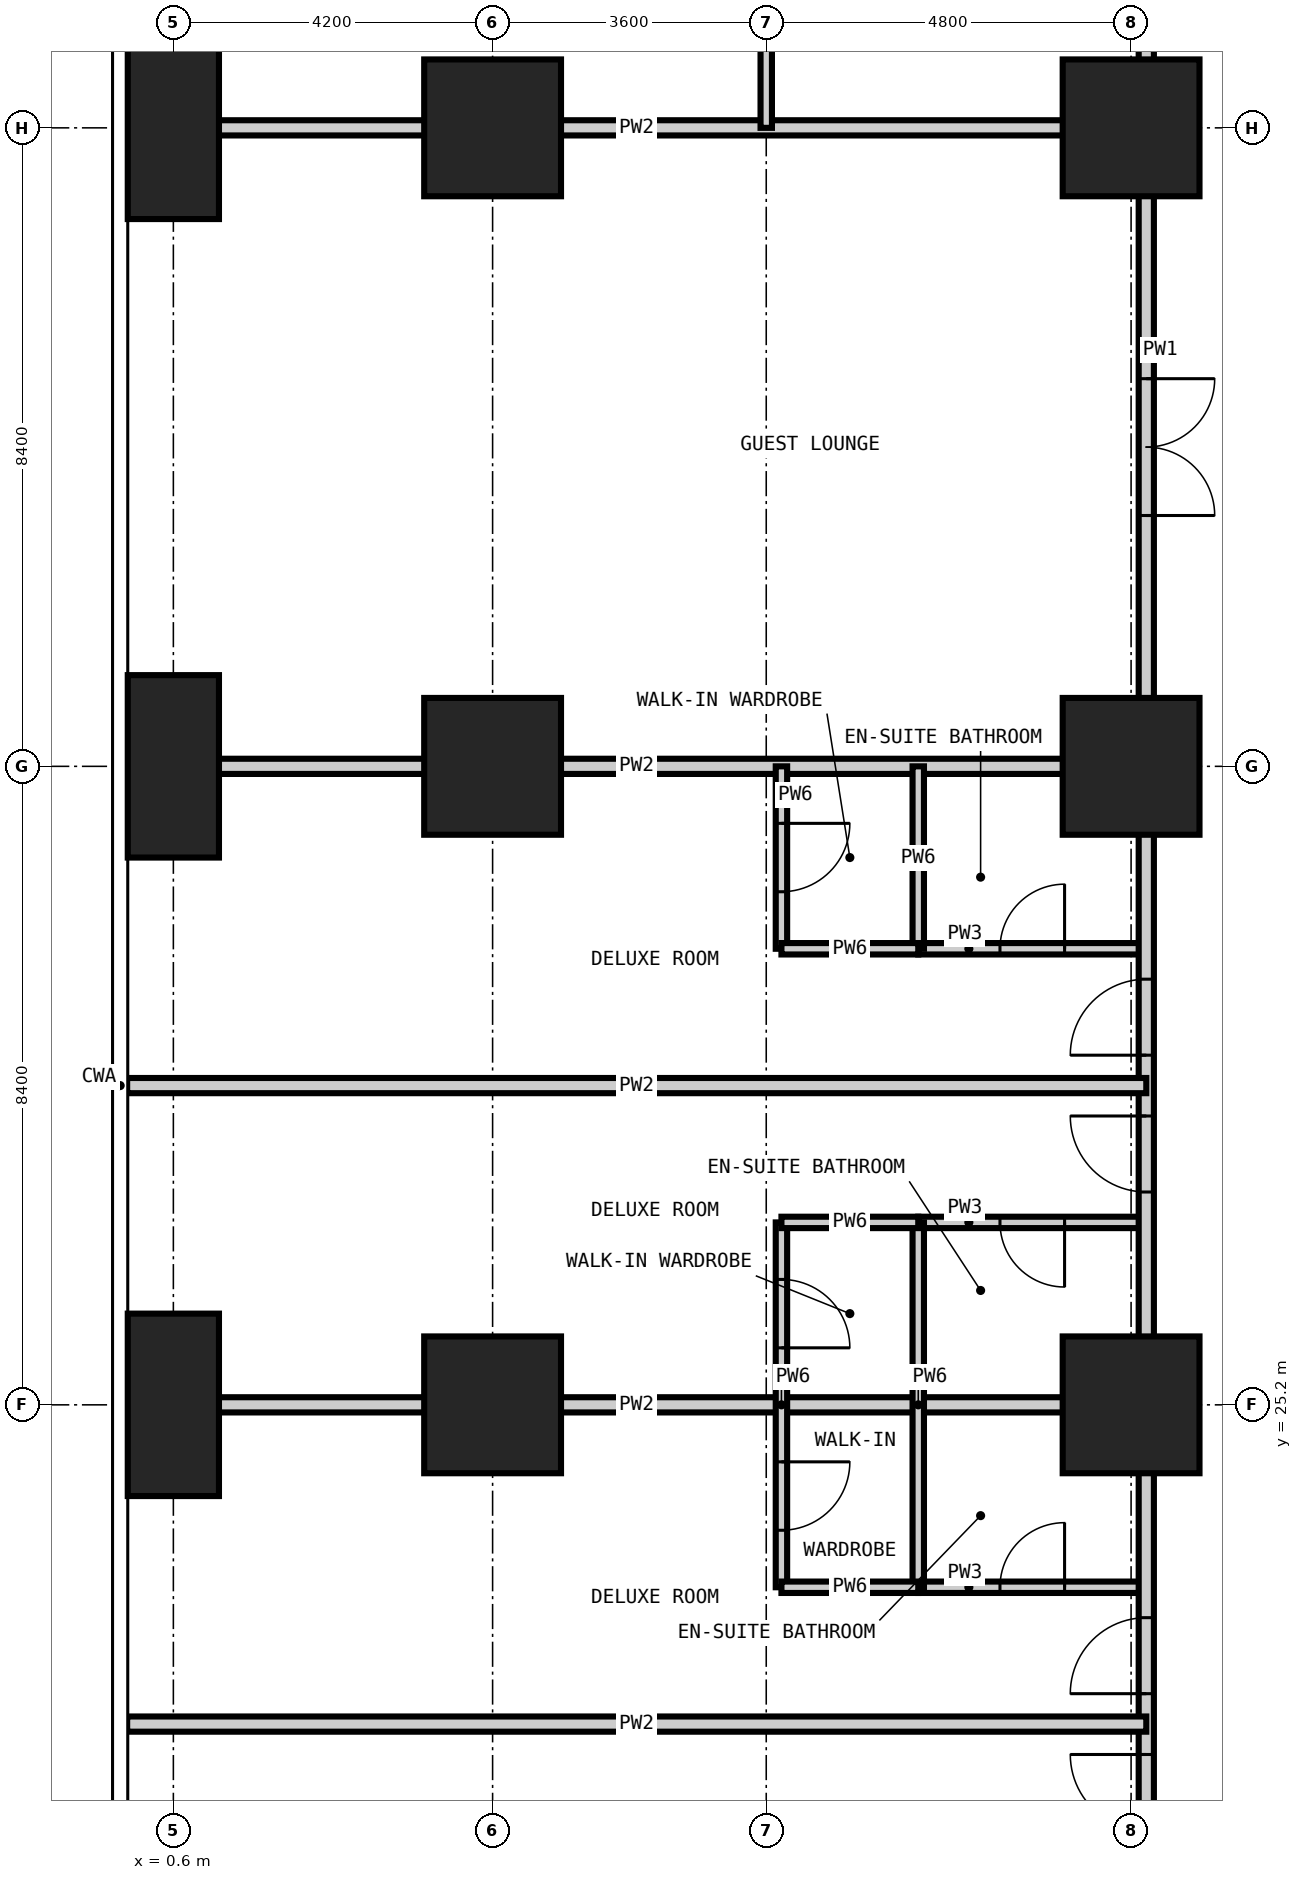
"""IFC4 building model, lengths in metres.
Left out: names, types, materials, properties, quantities, classifications, styles, units other than length and angle.
Written with IfcOpenShell. Run it as: python <this file> out.ifc"""

import sys

from ifc_helpers import new_model, si_unit, direction, frame, frame_2d, origin, origin_2d, place, context, subcontext, project, spatial, rectangle, extrude, element, fill, save


model = new_model("IFC4")
c1 = context("Model", 3, precision=1e-05, world=origin(), true_north=direction((0.0, 1.0)))
c2 = subcontext(c1, "Body", "Model", "MODEL_VIEW")
j1 = project(units=[si_unit("LENGTHUNIT", "METRE"), si_unit("PLANEANGLEUNIT", "RADIAN")], contexts=[c1])
p1 = place(None, origin())
s1 = spatial("IfcSite", under=j1, at=p1, CompositionType="ELEMENT")
p2 = place(p1, origin())
s2 = spatial("IfcBuilding", under=s1, at=p2, CompositionType="ELEMENT")
p3 = place(p2, frame((0.0, 0.0, 27.0)))
s3 = spatial("IfcBuildingStorey", under=s2, at=p3, CompositionType="ELEMENT", Elevation=27.0)
for number, where, z_axis, x_axis in (
    (1, (0.6, 25.2, -0.35), (0.0, 0.0, 1.0), (1.0, 0.0, 0.0)),
    (2, (0.6, 33.6, -0.35), (0.0, 0.0, 1.0), (1.0, 0.0, 0.0)),
    (3, (0.6, 42.0, -0.35), (0.0, 0.0, 1.0), (1.0, 0.0, 0.0)),
):
    element("IfcColumn", number, at=place(p3, frame(where, z_axis=z_axis, x_axis=x_axis)), inside=s3, PredefinedType="COLUMN", context=c2, shape_type="SweptSolid", body=[
        extrude(rectangle(XDim=1.2, YDim=2.4, at=origin_2d()), origin(), (0.0, 0.0, 1.0), 3.6),
    ])
for number, where, z_axis, x_axis in (
    (4, (4.8, 25.2, -0.35), (0.0, 0.0, 1.0), (1.0, 0.0, 0.0)),
    (5, (4.8, 33.6, -0.35), (0.0, 0.0, 1.0), (1.0, 0.0, 0.0)),
    (6, (4.8, 42.0, -0.35), (0.0, 0.0, 1.0), (1.0, 0.0, 0.0)),
    (7, (13.2, 25.2, -0.35), (0.0, 0.0, 1.0), (1.0, 0.0, 0.0)),
    (8, (13.2, 33.6, -0.35), (0.0, 0.0, 1.0), (1.0, 0.0, 0.0)),
    (9, (13.2, 42.0, -0.35), (0.0, 0.0, 1.0), (1.0, 0.0, 0.0)),
):
    element("IfcColumn", number, at=place(p3, frame(where, z_axis=z_axis, x_axis=x_axis)), inside=s3, PredefinedType="COLUMN", context=c2, shape_type="SweptSolid", body=[
        extrude(rectangle(XDim=1.8, YDim=1.8, at=origin_2d()), origin(), (0.0, 0.0, 1.0), 3.6),
    ])
p4 = place(p3, frame((10.4, 22.8, 0.0), z_axis=(0.0, 0.0, 1.0), x_axis=(1.0, 0.0, 0.0)))
e10 = element("IfcWall", 10, at=p4, inside=s3, PredefinedType="PARTITIONING", context=c2, shape_type="SweptSolid", body=[
    extrude(rectangle(XDim=3.0, YDim=0.15, at=frame_2d((1.5, 0.0))), origin(), (0.0, 0.0, 1.0), 3.25),
])
p5 = place(p4, frame((1.075, 0.0, 0.0)))
e11 = element("IfcOpeningElement", 11, at=p5, cuts=e10, PredefinedType="OPENING", context=c2, shape_type="SweptSolid", body=[
    extrude(rectangle(XDim=0.85, YDim=2.1, at=frame_2d((0.425, 1.05))), frame((0.0, 0.085, 0.0), z_axis=(0.0, -1.0, 0.0), x_axis=(1.0, 0.0, 0.0)), (0.0, 0.0, 1.0), 0.17),
])
p6 = place(p3, frame((10.4, 27.6, 0.0), z_axis=(0.0, 0.0, 1.0), x_axis=(1.0, 0.0, 0.0)))
e12 = element("IfcWall", 12, at=p6, inside=s3, PredefinedType="PARTITIONING", context=c2, shape_type="SweptSolid", body=[
    extrude(rectangle(XDim=3.0, YDim=0.15, at=frame_2d((1.5, 0.0))), origin(), (0.0, 0.0, 1.0), 3.25),
])
p7 = place(p6, frame((1.075, 0.0, 0.0)))
e13 = element("IfcOpeningElement", 13, at=p7, cuts=e12, PredefinedType="OPENING", context=c2, shape_type="SweptSolid", body=[
    extrude(rectangle(XDim=0.85, YDim=2.1, at=frame_2d((0.425, 1.05))), frame((0.0, 0.085, 0.0), z_axis=(0.0, -1.0, 0.0), x_axis=(1.0, 0.0, 0.0)), (0.0, 0.0, 1.0), 0.17),
])
p8 = place(p3, frame((10.4, 31.2, 0.0), z_axis=(0.0, 0.0, 1.0), x_axis=(1.0, 0.0, 0.0)))
e14 = element("IfcWall", 14, at=p8, inside=s3, PredefinedType="PARTITIONING", context=c2, shape_type="SweptSolid", body=[
    extrude(rectangle(XDim=3.0, YDim=0.15, at=frame_2d((1.5, 0.0))), origin(), (0.0, 0.0, 1.0), 3.25),
])
p9 = place(p8, frame((1.075, 0.0, 0.0)))
e15 = element("IfcOpeningElement", 15, at=p9, cuts=e14, PredefinedType="OPENING", context=c2, shape_type="SweptSolid", body=[
    extrude(rectangle(XDim=0.85, YDim=2.1, at=frame_2d((0.425, 1.05))), frame((0.0, 0.085, 0.0), z_axis=(0.0, -1.0, 0.0), x_axis=(1.0, 0.0, 0.0)), (0.0, 0.0, 1.0), 0.17),
])
p10 = place(p3, frame((13.4, 13.4, 0.0), z_axis=(0.0, 0.0, 1.0), x_axis=(0.0, 1.0, 0.0)))
e16 = element("IfcWall", 16, at=p10, inside=s3, PredefinedType="PARTITIONING", context=c2, shape_type="SweptSolid", body=[
    extrude(rectangle(XDim=20.2, YDim=0.2, at=frame_2d((10.1, 0.0))), origin(), (0.0, 0.0, 1.0), 3.25),
])
p11 = place(p10, frame((6.2, 0.0, 0.0)))
e17 = element("IfcOpeningElement", 17, at=p11, cuts=e16, PredefinedType="OPENING", context=c2, shape_type="SweptSolid", body=[
    extrude(rectangle(XDim=1.0, YDim=2.2, at=frame_2d((0.5, 1.1))), frame((0.0, 0.11, 0.0), z_axis=(0.0, -1.0, 0.0), x_axis=(1.0, 0.0, 0.0)), (0.0, 0.0, 1.0), 0.22),
])
p12 = place(p10, frame((8.0, 0.0, 0.0)))
e18 = element("IfcOpeningElement", 18, at=p12, cuts=e16, PredefinedType="OPENING", context=c2, shape_type="SweptSolid", body=[
    extrude(rectangle(XDim=1.0, YDim=2.2, at=frame_2d((0.5, 1.1))), frame((0.0, 0.11, 0.0), z_axis=(0.0, -1.0, 0.0), x_axis=(1.0, 0.0, 0.0)), (0.0, 0.0, 1.0), 0.22),
])
p13 = place(p10, frame((14.6, 0.0, 0.0)))
e19 = element("IfcOpeningElement", 19, at=p13, cuts=e16, PredefinedType="OPENING", context=c2, shape_type="SweptSolid", body=[
    extrude(rectangle(XDim=1.0, YDim=2.2, at=frame_2d((0.5, 1.1))), frame((0.0, 0.11, 0.0), z_axis=(0.0, -1.0, 0.0), x_axis=(1.0, 0.0, 0.0)), (0.0, 0.0, 1.0), 0.22),
])
p14 = place(p10, frame((16.4, 0.0, 0.0)))
e20 = element("IfcOpeningElement", 20, at=p14, cuts=e16, PredefinedType="OPENING", context=c2, shape_type="SweptSolid", body=[
    extrude(rectangle(XDim=1.0, YDim=2.2, at=frame_2d((0.5, 1.1))), frame((0.0, 0.11, 0.0), z_axis=(0.0, -1.0, 0.0), x_axis=(1.0, 0.0, 0.0)), (0.0, 0.0, 1.0), 0.22),
])
p15 = place(p10, frame((1.2, 0.0, 0.0)))
e21 = element("IfcOpeningElement", 21, at=p15, cuts=e16, PredefinedType="OPENING", context=c2, shape_type="SweptSolid", body=[
    extrude(rectangle(XDim=1.0, YDim=2.2, at=frame_2d((0.5, 1.1))), frame((0.0, 0.11, 0.0), z_axis=(0.0, -1.0, 0.0), x_axis=(1.0, 0.0, 0.0)), (0.0, 0.0, 1.0), 0.22),
])
p16 = place(p3, frame((13.4, 42.0, 0.0), z_axis=(0.0, 0.0, 1.0), x_axis=(0.0, 1.0, 0.0)))
e22 = element("IfcWall", 22, at=p16, inside=s3, PredefinedType="PARTITIONING", context=c2, shape_type="SweptSolid", body=[
    extrude(rectangle(XDim=4.0, YDim=0.2, at=frame_2d((2.0, 0.0))), origin(), (0.0, 0.0, 1.0), 3.25),
])
p17 = place(p16, frame((1.5, 0.0, 0.0)))
e23 = element("IfcOpeningElement", 23, at=p17, cuts=e22, PredefinedType="OPENING", context=c2, shape_type="SweptSolid", body=[
    extrude(rectangle(XDim=1.0, YDim=2.2, at=frame_2d((0.5, 1.1))), frame((0.0, 0.11, 0.0), z_axis=(0.0, -1.0, 0.0), x_axis=(1.0, 0.0, 0.0)), (0.0, 0.0, 1.0), 0.22),
])
p18 = place(p3, frame((13.4, 42.0, 0.0), z_axis=(0.0, 0.0, 1.0), x_axis=(0.0, -1.0, 0.0)))
e24 = element("IfcWall", 24, at=p18, inside=s3, PredefinedType="PARTITIONING", context=c2, shape_type="SweptSolid", body=[
    extrude(rectangle(XDim=8.4, YDim=0.2, at=frame_2d((4.2, 0.0))), origin(), (0.0, 0.0, 1.0), 3.25),
])
p19 = place(p18, frame((3.3, 0.0, 0.0)))
e25 = element("IfcOpeningElement", 25, at=p19, cuts=e24, PredefinedType="OPENING", context=c2, shape_type="SweptSolid", body=[
    extrude(rectangle(XDim=1.8, YDim=2.4, at=frame_2d((0.9, 1.2))), frame((0.0, 0.11, 0.0), z_axis=(0.0, -1.0, 0.0), x_axis=(1.0, 0.0, 0.0)), (0.0, 0.0, 1.0), 0.22),
])
for number, where, z_axis, x_axis in (
    (26, (-0.008, 21.0, 0.0), (0.0, 0.0, 1.0), (1.0, 0.0, 0.0)),
    (27, (-0.008, 25.2, 0.0), (0.0, 0.0, 1.0), (1.0, 0.0, 0.0)),
    (28, (-0.008, 29.4, 0.0), (0.0, 0.0, 1.0), (1.0, 0.0, 0.0)),
    (29, (-0.008, 33.6, 0.0), (0.0, 0.0, 1.0), (1.0, 0.0, 0.0)),
    (30, (-0.008, 42.0, 0.0), (0.0, 0.0, 1.0), (1.0, 0.0, 0.0)),
):
    element("IfcWall", number, at=place(p3, frame(where, z_axis=z_axis, x_axis=x_axis)), inside=s3, PredefinedType="PARTITIONING", context=c2, shape_type="SweptSolid", body=[
        extrude(rectangle(XDim=13.408, YDim=0.2, at=frame_2d((6.704, 0.0))), origin(), (0.0, 0.0, 1.0), 3.25),
    ])
p20 = place(p3, frame((8.4, 42.0, 0.0), z_axis=(0.0, 0.0, 1.0), x_axis=(0.0, 1.0, 0.0)))
e31 = element("IfcWall", 31, at=p20, inside=s3, PredefinedType="PARTITIONING", context=c2, shape_type="SweptSolid", body=[
    extrude(rectangle(XDim=16.808, YDim=0.15, at=frame_2d((8.404, 0.0))), origin(), (0.0, 0.0, 1.0), 3.25),
])
p21 = place(p20, frame((13.95, 0.0, 0.0)))
e32 = element("IfcOpeningElement", 32, at=p21, cuts=e31, PredefinedType="OPENING", context=c2, shape_type="SweptSolid", body=[
    extrude(rectangle(XDim=0.9, YDim=2.1, at=frame_2d((0.45, 1.05))), frame((0.0, 0.085, 0.0), z_axis=(0.0, -1.0, 0.0), x_axis=(1.0, 0.0, 0.0)), (0.0, 0.0, 1.0), 0.17),
])
p22 = place(p20, frame((3.75, 0.0, 0.0)))
e33 = element("IfcOpeningElement", 33, at=p22, cuts=e31, PredefinedType="OPENING", context=c2, shape_type="SweptSolid", body=[
    extrude(rectangle(XDim=0.9, YDim=2.1, at=frame_2d((0.45, 1.05))), frame((0.0, 0.085, 0.0), z_axis=(0.0, -1.0, 0.0), x_axis=(1.0, 0.0, 0.0)), (0.0, 0.0, 1.0), 0.17),
])
p23 = place(p3, frame((8.6, 22.8, 0.0), z_axis=(0.0, 0.0, 1.0), x_axis=(0.0, 1.0, 0.0)))
e34 = element("IfcWall", 34, at=p23, inside=s3, PredefinedType="PARTITIONING", context=c2, shape_type="SweptSolid", body=[
    extrude(rectangle(XDim=4.8, YDim=0.15, at=frame_2d((2.4, 0.0))), origin(), (0.0, 0.0, 1.0), 3.25),
])
p24 = place(p23, frame((0.75, 0.0, 0.0)))
e35 = element("IfcOpeningElement", 35, at=p24, cuts=e34, PredefinedType="OPENING", context=c2, shape_type="SweptSolid", body=[
    extrude(rectangle(XDim=0.9, YDim=2.1, at=frame_2d((0.45, 1.05))), frame((0.0, 0.085, 0.0), z_axis=(0.0, -1.0, 0.0), x_axis=(1.0, 0.0, 0.0)), (0.0, 0.0, 1.0), 0.17),
])
p25 = place(p23, frame((3.15, 0.0, 0.0)))
e36 = element("IfcOpeningElement", 36, at=p25, cuts=e34, PredefinedType="OPENING", context=c2, shape_type="SweptSolid", body=[
    extrude(rectangle(XDim=0.9, YDim=2.1, at=frame_2d((0.45, 1.05))), frame((0.0, 0.085, 0.0), z_axis=(0.0, -1.0, 0.0), x_axis=(1.0, 0.0, 0.0)), (0.0, 0.0, 1.0), 0.17),
])
p26 = place(p3, frame((8.6, 31.2, 0.0), z_axis=(0.0, 0.0, 1.0), x_axis=(0.0, 1.0, 0.0)))
e37 = element("IfcWall", 37, at=p26, inside=s3, PredefinedType="PARTITIONING", context=c2, shape_type="SweptSolid", body=[
    extrude(rectangle(XDim=2.4, YDim=0.15, at=frame_2d((1.2, 0.0))), origin(), (0.0, 0.0, 1.0), 3.25),
])
p27 = place(p26, frame((0.75, 0.0, 0.0)))
e38 = element("IfcOpeningElement", 38, at=p27, cuts=e37, PredefinedType="OPENING", context=c2, shape_type="SweptSolid", body=[
    extrude(rectangle(XDim=0.9, YDim=2.1, at=frame_2d((0.45, 1.05))), frame((0.0, 0.085, 0.0), z_axis=(0.0, -1.0, 0.0), x_axis=(1.0, 0.0, 0.0)), (0.0, 0.0, 1.0), 0.17),
])
p28 = place(p3, frame((10.4, 22.8, 0.0), z_axis=(0.0, 0.0, 1.0), x_axis=(0.0, 1.0, 0.0)))
e39 = element("IfcWall", 39, at=p28, inside=s3, PredefinedType="PARTITIONING", context=c2, shape_type="SweptSolid", body=[
    extrude(rectangle(XDim=4.8, YDim=0.15, at=frame_2d((2.4, 0.0))), origin(), (0.0, 0.0, 1.0), 3.25),
])
p29 = place(p3, frame((10.4, 31.2, 0.0), z_axis=(0.0, 0.0, 1.0), x_axis=(0.0, 1.0, 0.0)))
e40 = element("IfcWall", 40, at=p29, inside=s3, PredefinedType="PARTITIONING", context=c2, shape_type="SweptSolid", body=[
    extrude(rectangle(XDim=2.4, YDim=0.15, at=frame_2d((1.2, 0.0))), origin(), (0.0, 0.0, 1.0), 3.25),
])
for number, where, z_axis, x_axis in (
    (41, (8.6, 22.8, 0.0), (0.0, 0.0, 1.0), (1.0, 0.0, 0.0)),
    (42, (8.6, 27.6, 0.0), (0.0, 0.0, 1.0), (1.0, 0.0, 0.0)),
    (43, (8.6, 31.2, 0.0), (0.0, 0.0, 1.0), (1.0, 0.0, 0.0)),
):
    element("IfcWall", number, at=place(p3, frame(where, z_axis=z_axis, x_axis=x_axis)), inside=s3, PredefinedType="PARTITIONING", context=c2, shape_type="SweptSolid", body=[
        extrude(rectangle(XDim=1.8, YDim=0.15, at=frame_2d((0.9, 0.0))), origin(), (0.0, 0.0, 1.0), 3.25),
    ])
p30 = place(p11, origin())
e44 = element("IfcDoor", 44, at=p30, inside=s3, OperationType="SINGLE_SWING_RIGHT", PredefinedType="DOOR", context=c2, shape_type="SweptSolid", body=[
    extrude(rectangle(XDim=1.0, YDim=2.2, at=frame_2d((0.5, 1.1))), frame((0.0, 0.025, 0.0), z_axis=(0.0, -1.0, 0.0), x_axis=(1.0, 0.0, 0.0)), (0.0, 0.0, 1.0), 0.05),
])
fill(e17, e44)
p31 = place(p12, origin())
e45 = element("IfcDoor", 45, at=p31, inside=s3, OperationType="SINGLE_SWING_LEFT", PredefinedType="DOOR", context=c2, shape_type="SweptSolid", body=[
    extrude(rectangle(XDim=1.0, YDim=2.2, at=frame_2d((0.5, 1.1))), frame((0.0, 0.025, 0.0), z_axis=(0.0, -1.0, 0.0), x_axis=(1.0, 0.0, 0.0)), (0.0, 0.0, 1.0), 0.05),
])
fill(e18, e45)
p32 = place(p5, origin())
e46 = element("IfcDoor", 46, at=p32, inside=s3, OperationType="SINGLE_SWING_RIGHT", PredefinedType="DOOR", context=c2, shape_type="SweptSolid", body=[
    extrude(rectangle(XDim=0.85, YDim=2.1, at=frame_2d((0.425, 1.05))), frame((0.0, 0.025, 0.0), z_axis=(0.0, -1.0, 0.0), x_axis=(1.0, 0.0, 0.0)), (0.0, 0.0, 1.0), 0.05),
])
fill(e11, e46)
p33 = place(p24, frame((0.9, 0.0, 0.0), z_axis=(0.0, 0.0, 1.0), x_axis=(-1.0, 0.0, 0.0)))
e47 = element("IfcDoor", 47, at=p33, inside=s3, OperationType="SINGLE_SWING_LEFT", PredefinedType="DOOR", context=c2, shape_type="SweptSolid", body=[
    extrude(rectangle(XDim=0.9, YDim=2.1, at=frame_2d((0.45, 1.05))), frame((0.0, 0.025, 0.0), z_axis=(0.0, -1.0, 0.0), x_axis=(1.0, 0.0, 0.0)), (0.0, 0.0, 1.0), 0.05),
])
fill(e35, e47)
p34 = place(p13, origin())
e48 = element("IfcDoor", 48, at=p34, inside=s3, OperationType="SINGLE_SWING_RIGHT", PredefinedType="DOOR", context=c2, shape_type="SweptSolid", body=[
    extrude(rectangle(XDim=1.0, YDim=2.2, at=frame_2d((0.5, 1.1))), frame((0.0, 0.025, 0.0), z_axis=(0.0, -1.0, 0.0), x_axis=(1.0, 0.0, 0.0)), (0.0, 0.0, 1.0), 0.05),
])
fill(e19, e48)
p35 = place(p7, frame((0.85, 0.0, 0.0), z_axis=(0.0, 0.0, 1.0), x_axis=(-1.0, 0.0, 0.0)))
e49 = element("IfcDoor", 49, at=p35, inside=s3, OperationType="SINGLE_SWING_LEFT", PredefinedType="DOOR", context=c2, shape_type="SweptSolid", body=[
    extrude(rectangle(XDim=0.85, YDim=2.1, at=frame_2d((0.425, 1.05))), frame((0.0, 0.025, 0.0), z_axis=(0.0, -1.0, 0.0), x_axis=(1.0, 0.0, 0.0)), (0.0, 0.0, 1.0), 0.05),
])
fill(e13, e49)
p36 = place(p25, frame((0.9, 0.0, 0.0), z_axis=(0.0, 0.0, 1.0), x_axis=(-1.0, 0.0, 0.0)))
e50 = element("IfcDoor", 50, at=p36, inside=s3, OperationType="SINGLE_SWING_RIGHT", PredefinedType="DOOR", context=c2, shape_type="SweptSolid", body=[
    extrude(rectangle(XDim=0.9, YDim=2.1, at=frame_2d((0.45, 1.05))), frame((0.0, 0.025, 0.0), z_axis=(0.0, -1.0, 0.0), x_axis=(1.0, 0.0, 0.0)), (0.0, 0.0, 1.0), 0.05),
])
fill(e36, e50)
p37 = place(p14, origin())
e51 = element("IfcDoor", 51, at=p37, inside=s3, OperationType="SINGLE_SWING_LEFT", PredefinedType="DOOR", context=c2, shape_type="SweptSolid", body=[
    extrude(rectangle(XDim=1.0, YDim=2.2, at=frame_2d((0.5, 1.1))), frame((0.0, 0.025, 0.0), z_axis=(0.0, -1.0, 0.0), x_axis=(1.0, 0.0, 0.0)), (0.0, 0.0, 1.0), 0.05),
])
fill(e20, e51)
p38 = place(p9, origin())
e52 = element("IfcDoor", 52, at=p38, inside=s3, OperationType="SINGLE_SWING_RIGHT", PredefinedType="DOOR", context=c2, shape_type="SweptSolid", body=[
    extrude(rectangle(XDim=0.85, YDim=2.1, at=frame_2d((0.425, 1.05))), frame((0.0, 0.025, 0.0), z_axis=(0.0, -1.0, 0.0), x_axis=(1.0, 0.0, 0.0)), (0.0, 0.0, 1.0), 0.05),
])
fill(e15, e52)
p39 = place(p27, frame((0.9, 0.0, 0.0), z_axis=(0.0, 0.0, 1.0), x_axis=(-1.0, 0.0, 0.0)))
e53 = element("IfcDoor", 53, at=p39, inside=s3, OperationType="SINGLE_SWING_LEFT", PredefinedType="DOOR", context=c2, shape_type="SweptSolid", body=[
    extrude(rectangle(XDim=0.9, YDim=2.1, at=frame_2d((0.45, 1.05))), frame((0.0, 0.025, 0.0), z_axis=(0.0, -1.0, 0.0), x_axis=(1.0, 0.0, 0.0)), (0.0, 0.0, 1.0), 0.05),
])
fill(e38, e53)
p40 = place(p19, origin())
e54 = element("IfcDoor", 54, at=p40, inside=s3, OperationType="DOUBLE_DOOR_DOUBLE_SWING", PredefinedType="DOOR", context=c2, shape_type="SweptSolid", body=[
    extrude(rectangle(XDim=1.8, YDim=2.4, at=frame_2d((0.9, 1.2))), frame((0.0, 0.025, 0.0), z_axis=(0.0, -1.0, 0.0), x_axis=(1.0, 0.0, 0.0)), (0.0, 0.0, 1.0), 0.05),
])
fill(e25, e54)
save(model, sys.argv[1])
